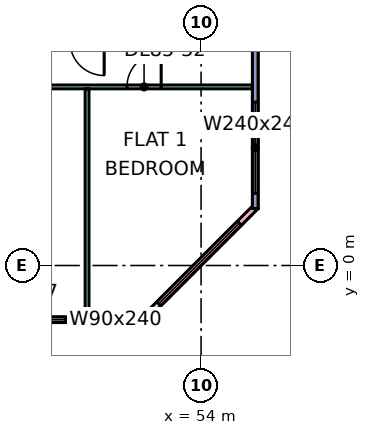
"""IFC4 building model, lengths in metres.
Left out: names, types, materials, properties, quantities, classifications, styles, units other than length and angle.
Written with IfcOpenShell. Run it as: python <this file> out.ifc"""

import sys

from ifc_helpers import new_model, si_unit, direction, frame, frame_2d, origin, place, context, subcontext, project, spatial, rectangle, extrude, element, fill, save


model = new_model("IFC4")
c1 = context("Model", 3, precision=1e-05, world=origin(), true_north=direction((0.0, 1.0)))
c2 = subcontext(c1, "Body", "Model", "MODEL_VIEW")
j1 = project(units=[si_unit("LENGTHUNIT", "METRE"), si_unit("PLANEANGLEUNIT", "RADIAN")], contexts=[c1])
p1 = place(None, origin())
s1 = spatial("IfcSite", under=j1, at=p1, CompositionType="ELEMENT")
p2 = place(p1, origin())
s2 = spatial("IfcBuilding", under=s1, at=p2, CompositionType="ELEMENT")
p3 = place(p2, frame((0.0, 0.0, 365.15)))
s3 = spatial("IfcBuildingStorey", under=s2, at=p3, CompositionType="ELEMENT", Elevation=365.15)
p4 = place(p3, frame((48.075, -1.425, 0.0), z_axis=(0.0, 0.0, 1.0), x_axis=(1.0, 0.0, 0.0)))
e1 = element("IfcWall", 1, at=p4, inside=s3, PredefinedType="SOLIDWALL", context=c2, shape_type="SweptSolid", body=[
    extrude(rectangle(XDim=4.425, YDim=0.15, at=frame_2d((2.212, 0.0))), origin(), (0.0, 0.0, 1.0), 3.35),
])
p5 = place(p4, frame((0.562, 0.0, 0.45)))
e2 = element("IfcOpeningElement", 2, at=p5, cuts=e1, PredefinedType="OPENING", context=c2, shape_type="SweptSolid", body=[
    extrude(rectangle(XDim=1.8, YDim=2.4, at=frame_2d((0.9, 1.2))), frame((0.0, 0.085, 0.0), z_axis=(0.0, -1.0, 0.0), x_axis=(1.0, 0.0, 0.0)), (0.0, 0.0, 1.0), 0.17),
])
p6 = place(p4, frame((3.225, 0.0, 0.45)))
e3 = element("IfcOpeningElement", 3, at=p6, cuts=e1, PredefinedType="OPENING", context=c2, shape_type="SweptSolid", body=[
    extrude(rectangle(XDim=0.9, YDim=2.4, at=frame_2d((0.45, 1.2))), frame((0.0, 0.085, 0.0), z_axis=(0.0, -1.0, 0.0), x_axis=(1.0, 0.0, 0.0)), (0.0, 0.0, 1.0), 0.17),
])
p7 = place(p3, frame((52.447, -1.447, 0.0), z_axis=(0.0, 0.0, 1.0), x_axis=(0.707106781187, 0.707106781187, 0.0)))
e4 = element("IfcWall", 4, at=p7, inside=s3, PredefinedType="SOLIDWALL", context=c2, shape_type="SweptSolid", body=[
    extrude(rectangle(XDim=4.243, YDim=0.15, at=frame_2d((2.121, 0.0))), origin(), (0.0, 0.0, 1.0), 3.35),
])
p8 = place(p7, frame((0.621, 0.0, 0.45)))
e5 = element("IfcOpeningElement", 5, at=p8, cuts=e4, PredefinedType="OPENING", context=c2, shape_type="SweptSolid", body=[
    extrude(rectangle(XDim=3.0, YDim=2.4, at=frame_2d((1.5, 1.2))), frame((0.0, 0.085, 0.0), z_axis=(0.0, -1.0, 0.0), x_axis=(1.0, 0.0, 0.0)), (0.0, 0.0, 1.0), 0.17),
])
p9 = place(p3, frame((55.425, 1.5, 0.0), z_axis=(0.0, 0.0, 1.0), x_axis=(0.0, 1.0, 0.0)))
e6 = element("IfcWall", 6, at=p9, inside=s3, PredefinedType="SOLIDWALL", context=c2, shape_type="SweptSolid", body=[
    extrude(rectangle(XDim=10.425, YDim=0.15, at=frame_2d((5.212, 0.0))), origin(), (0.0, 0.0, 1.0), 3.35),
])
p10 = place(p9, frame((0.4, 0.0, 0.45)))
e7 = element("IfcOpeningElement", 7, at=p10, cuts=e6, PredefinedType="OPENING", context=c2, shape_type="SweptSolid", body=[
    extrude(rectangle(XDim=2.4, YDim=2.4, at=frame_2d((1.2, 1.2))), frame((0.0, 0.085, 0.0), z_axis=(0.0, -1.0, 0.0), x_axis=(1.0, 0.0, 0.0)), (0.0, 0.0, 1.0), 0.17),
])
p11 = place(p3, frame((33.05, 4.7, 0.0), z_axis=(0.0, 0.0, 1.0), x_axis=(1.0, 0.0, 0.0)))
e8 = element("IfcWall", 8, at=p11, inside=s3, PredefinedType="PARTITIONING", context=c2, shape_type="SweptSolid", body=[
    extrude(rectangle(XDim=22.301, YDim=0.1, at=frame_2d((11.15, 0.0))), origin(), (0.0, 0.0, 1.0), 3.35),
])
p12 = place(p11, frame((1.0, 0.0, 0.0)))
e9 = element("IfcOpeningElement", 9, at=p12, cuts=e8, PredefinedType="OPENING", context=c2, shape_type="SweptSolid", body=[
    extrude(rectangle(XDim=0.9, YDim=2.1, at=frame_2d((0.45, 1.05))), frame((0.0, 0.06, 0.0), z_axis=(0.0, -1.0, 0.0), x_axis=(1.0, 0.0, 0.0)), (0.0, 0.0, 1.0), 0.12),
])
p13 = place(p11, frame((4.0, 0.0, 0.0)))
e10 = element("IfcOpeningElement", 10, at=p13, cuts=e8, PredefinedType="OPENING", context=c2, shape_type="SweptSolid", body=[
    extrude(rectangle(XDim=0.9, YDim=2.1, at=frame_2d((0.45, 1.05))), frame((0.0, 0.06, 0.0), z_axis=(0.0, -1.0, 0.0), x_axis=(1.0, 0.0, 0.0)), (0.0, 0.0, 1.0), 0.12),
])
p14 = place(p11, frame((7.0, 0.0, 0.0)))
e11 = element("IfcOpeningElement", 11, at=p14, cuts=e8, PredefinedType="OPENING", context=c2, shape_type="SweptSolid", body=[
    extrude(rectangle(XDim=0.9, YDim=2.1, at=frame_2d((0.45, 1.05))), frame((0.0, 0.06, 0.0), z_axis=(0.0, -1.0, 0.0), x_axis=(1.0, 0.0, 0.0)), (0.0, 0.0, 1.0), 0.12),
])
p15 = place(p11, frame((19.0, 0.0, 0.0)))
e12 = element("IfcOpeningElement", 12, at=p15, cuts=e8, PredefinedType="OPENING", context=c2, shape_type="SweptSolid", body=[
    extrude(rectangle(XDim=0.9, YDim=2.1, at=frame_2d((0.45, 1.05))), frame((0.0, 0.06, 0.0), z_axis=(0.0, -1.0, 0.0), x_axis=(1.0, 0.0, 0.0)), (0.0, 0.0, 1.0), 0.12),
])
p16 = place(p11, frame((13.0, 0.0, 0.0)))
e13 = element("IfcOpeningElement", 13, at=p16, cuts=e8, PredefinedType="OPENING", context=c2, shape_type="SweptSolid", body=[
    extrude(rectangle(XDim=0.9, YDim=2.1, at=frame_2d((0.45, 1.05))), frame((0.0, 0.06, 0.0), z_axis=(0.0, -1.0, 0.0), x_axis=(1.0, 0.0, 0.0)), (0.0, 0.0, 1.0), 0.12),
])
p17 = place(p3, frame((51.0, -1.35, 0.0), z_axis=(0.0, 0.0, 1.0), x_axis=(0.0, 1.0, 0.0)))
e14 = element("IfcWall", 14, at=p17, inside=s3, PredefinedType="PARTITIONING", context=c2, shape_type="SweptSolid", body=[
    extrude(rectangle(XDim=6.0, YDim=0.1, at=frame_2d((3.0, 0.0))), origin(), (0.0, 0.0, 1.0), 3.35),
])
p18 = place(p5, origin())
e15 = element("IfcWindow", 15, at=p18, inside=s3, PartitioningType="SINGLE_PANEL", PredefinedType="WINDOW", context=c2, shape_type="SweptSolid", body=[
    extrude(rectangle(XDim=1.8, YDim=2.4, at=frame_2d((0.9, 1.2))), frame((0.0, 0.03, 0.0), z_axis=(0.0, -1.0, 0.0), x_axis=(1.0, 0.0, 0.0)), (0.0, 0.0, 1.0), 0.06),
])
fill(e2, e15)
p19 = place(p6, origin())
e16 = element("IfcWindow", 16, at=p19, inside=s3, PartitioningType="SINGLE_PANEL", PredefinedType="WINDOW", context=c2, shape_type="SweptSolid", body=[
    extrude(rectangle(XDim=0.9, YDim=2.4, at=frame_2d((0.45, 1.2))), frame((0.0, 0.03, 0.0), z_axis=(0.0, -1.0, 0.0), x_axis=(1.0, 0.0, 0.0)), (0.0, 0.0, 1.0), 0.06),
])
fill(e3, e16)
p20 = place(p8, origin())
e17 = element("IfcWindow", 17, at=p20, inside=s3, PartitioningType="SINGLE_PANEL", PredefinedType="WINDOW", context=c2, shape_type="SweptSolid", body=[
    extrude(rectangle(XDim=3.0, YDim=2.4, at=frame_2d((1.5, 1.2))), frame((0.0, 0.03, 0.0), z_axis=(0.0, -1.0, 0.0), x_axis=(1.0, 0.0, 0.0)), (0.0, 0.0, 1.0), 0.06),
])
fill(e5, e17)
p21 = place(p10, origin())
e18 = element("IfcWindow", 18, at=p21, inside=s3, PartitioningType="SINGLE_PANEL", PredefinedType="WINDOW", context=c2, shape_type="SweptSolid", body=[
    extrude(rectangle(XDim=2.4, YDim=2.4, at=frame_2d((1.2, 1.2))), frame((0.0, 0.03, 0.0), z_axis=(0.0, -1.0, 0.0), x_axis=(1.0, 0.0, 0.0)), (0.0, 0.0, 1.0), 0.06),
])
fill(e7, e18)
p22 = place(p15, frame((0.9, 0.0, 0.0), z_axis=(0.0, 0.0, 1.0), x_axis=(-1.0, 0.0, 0.0)))
e19 = element("IfcDoor", 19, at=p22, inside=s3, OperationType="SINGLE_SWING_RIGHT", PredefinedType="DOOR", context=c2, shape_type="SweptSolid", body=[
    extrude(rectangle(XDim=0.9, YDim=2.1, at=frame_2d((0.45, 1.05))), frame((0.0, 0.025, 0.0), z_axis=(0.0, -1.0, 0.0), x_axis=(1.0, 0.0, 0.0)), (0.0, 0.0, 1.0), 0.05),
])
fill(e12, e19)
save(model, sys.argv[1])
